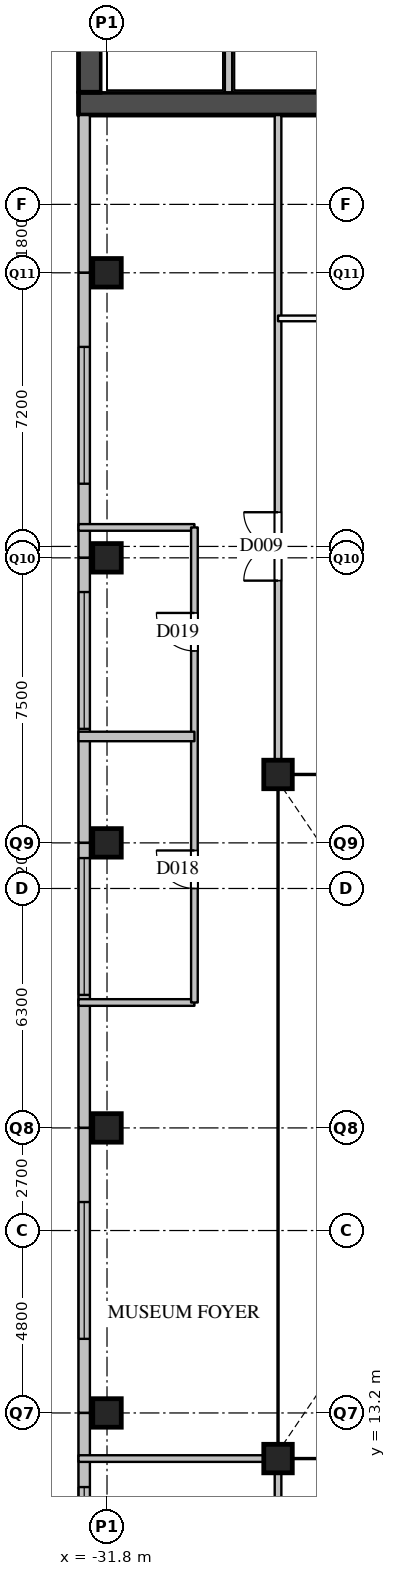
"""IFC4 building model, lengths in metres.
Left out: names, types, materials, properties, quantities, classifications, styles, units other than length and angle.
Written with IfcOpenShell. Run it as: python <this file> out.ifc"""

import sys

from ifc_helpers import new_model, si_unit, direction, frame, frame_2d, origin, origin_2d, place, context, subcontext, project, spatial, rectangle, extrude, element, fill, save


model = new_model("IFC4")
c1 = context("Model", 3, precision=1e-05, world=origin(), true_north=direction((0.0, 1.0)))
c2 = subcontext(c1, "Body", "Model", "MODEL_VIEW")
j1 = project(units=[si_unit("LENGTHUNIT", "METRE"), si_unit("PLANEANGLEUNIT", "RADIAN")], contexts=[c1])
p1 = place(None, origin())
s1 = spatial("IfcSite", under=j1, at=p1, CompositionType="ELEMENT")
p2 = place(p1, origin())
s2 = spatial("IfcBuilding", under=s1, at=p2, CompositionType="ELEMENT")
p3 = place(p2, frame((0.0, 0.0, 8.0)))
s3 = spatial("IfcBuildingStorey", under=s2, at=p3, CompositionType="ELEMENT", Elevation=8.0)
for number, where, z_axis, x_axis in (
    (1, (-31.8, 13.2, 0.0), (0.0, 0.0, 1.0), (1.0, 0.0, 0.0)),
    (2, (-31.8, 20.7, 0.0), (0.0, 0.0, 1.0), (1.0, 0.0, 0.0)),
    (3, (-31.8, 28.2, 0.0), (0.0, 0.0, 1.0), (1.0, 0.0, 0.0)),
    (4, (-31.8, 35.7, 0.0), (0.0, 0.0, 1.0), (1.0, 0.0, 0.0)),
    (5, (-31.8, 43.2, 0.0), (0.0, 0.0, 1.0), (1.0, 0.0, 0.0)),
    (6, (-27.3, 12.0, 0.0), (0.0, 0.0, 1.0), (1.0, 0.0, 0.0)),
    (7, (-27.3, 30.0, 0.0), (0.0, 0.0, 1.0), (1.0, 0.0, 0.0)),
):
    element("IfcColumn", number, at=place(p3, frame(where, z_axis=z_axis, x_axis=x_axis)), inside=s3, PredefinedType="COLUMN", context=c2, shape_type="SweptSolid", body=[
        extrude(rectangle(XDim=0.75, YDim=0.75, at=origin_2d()), origin(), (0.0, 0.0, 1.0), 6.0),
    ])
p4 = place(p3, frame((-32.4, 47.35, 0.0), z_axis=(0.0, 0.0, 1.0), x_axis=(0.0, -1.0, 0.0)))
e8 = element("IfcWall", 8, at=p4, inside=s3, PredefinedType="SOLIDWALL", context=c2, shape_type="SweptSolid", body=[
    extrude(rectangle(XDim=4.15, YDim=0.3, at=frame_2d((2.075, 0.0))), origin(), (0.0, 0.0, 1.0), 5.59),
])
p5 = place(p3, frame((-32.4, 43.2, 0.0), z_axis=(0.0, 0.0, 1.0), x_axis=(0.0, -1.0, 0.0)))
e9 = element("IfcWall", 9, at=p5, inside=s3, PredefinedType="SOLIDWALL", context=c2, shape_type="SweptSolid", body=[
    extrude(rectangle(XDim=7.5, YDim=0.3, at=frame_2d((3.75, 0.0))), origin(), (0.0, 0.0, 1.0), 5.59),
])
p6 = place(p5, frame((1.95, 0.0, 2.4)))
e10 = element("IfcOpeningElement", 10, at=p6, cuts=e9, PredefinedType="OPENING", context=c2, shape_type="SweptSolid", body=[
    extrude(rectangle(XDim=3.6, YDim=1.2, at=frame_2d((1.8, 0.6))), frame((0.0, 0.16, 0.0), z_axis=(0.0, -1.0, 0.0), x_axis=(1.0, 0.0, 0.0)), (0.0, 0.0, 1.0), 0.32),
])
p7 = place(p3, frame((-32.4, 35.7, 0.0), z_axis=(0.0, 0.0, 1.0), x_axis=(0.0, -1.0, 0.0)))
e11 = element("IfcWall", 11, at=p7, inside=s3, PredefinedType="SOLIDWALL", context=c2, shape_type="SweptSolid", body=[
    extrude(rectangle(XDim=7.5, YDim=0.3, at=frame_2d((3.75, 0.0))), origin(), (0.0, 0.0, 1.0), 5.59),
])
p8 = place(p7, frame((0.9, 0.0, 2.4)))
e12 = element("IfcOpeningElement", 12, at=p8, cuts=e11, PredefinedType="OPENING", context=c2, shape_type="SweptSolid", body=[
    extrude(rectangle(XDim=3.6, YDim=1.2, at=frame_2d((1.8, 0.6))), frame((0.0, 0.16, 0.0), z_axis=(0.0, -1.0, 0.0), x_axis=(1.0, 0.0, 0.0)), (0.0, 0.0, 1.0), 0.32),
])
p9 = place(p3, frame((-32.4, 28.2, 0.0), z_axis=(0.0, 0.0, 1.0), x_axis=(0.0, -1.0, 0.0)))
e13 = element("IfcWall", 13, at=p9, inside=s3, PredefinedType="SOLIDWALL", context=c2, shape_type="SweptSolid", body=[
    extrude(rectangle(XDim=7.5, YDim=0.3, at=frame_2d((3.75, 0.0))), origin(), (0.0, 0.0, 1.0), 5.59),
])
p10 = place(p9, frame((0.4, 0.0, 2.4)))
e14 = element("IfcOpeningElement", 14, at=p10, cuts=e13, PredefinedType="OPENING", context=c2, shape_type="SweptSolid", body=[
    extrude(rectangle(XDim=3.6, YDim=1.2, at=frame_2d((1.8, 0.6))), frame((0.0, 0.16, 0.0), z_axis=(0.0, -1.0, 0.0), x_axis=(1.0, 0.0, 0.0)), (0.0, 0.0, 1.0), 0.32),
])
p11 = place(p3, frame((-32.4, 20.7, 0.0), z_axis=(0.0, 0.0, 1.0), x_axis=(0.0, -1.0, 0.0)))
e15 = element("IfcWall", 15, at=p11, inside=s3, PredefinedType="SOLIDWALL", context=c2, shape_type="SweptSolid", body=[
    extrude(rectangle(XDim=7.5, YDim=0.3, at=frame_2d((3.75, 0.0))), origin(), (0.0, 0.0, 1.0), 5.59),
])
p12 = place(p11, frame((1.95, 0.0, 2.4)))
e16 = element("IfcOpeningElement", 16, at=p12, cuts=e15, PredefinedType="OPENING", context=c2, shape_type="SweptSolid", body=[
    extrude(rectangle(XDim=3.6, YDim=1.2, at=frame_2d((1.8, 0.6))), frame((0.0, 0.16, 0.0), z_axis=(0.0, -1.0, 0.0), x_axis=(1.0, 0.0, 0.0)), (0.0, 0.0, 1.0), 0.32),
])
p13 = place(p3, frame((-32.4, 13.2, 0.0), z_axis=(0.0, 0.0, 1.0), x_axis=(0.0, -1.0, 0.0)))
e17 = element("IfcWall", 17, at=p13, inside=s3, PredefinedType="SOLIDWALL", context=c2, shape_type="SweptSolid", body=[
    extrude(rectangle(XDim=7.5, YDim=0.3, at=frame_2d((3.75, 0.0))), origin(), (0.0, 0.0, 1.0), 5.59),
])
p14 = place(p13, frame((1.95, 0.0, 2.4)))
e18 = element("IfcOpeningElement", 18, at=p14, cuts=e17, PredefinedType="OPENING", context=c2, shape_type="SweptSolid", body=[
    extrude(rectangle(XDim=3.6, YDim=1.2, at=frame_2d((1.8, 0.6))), frame((0.0, 0.16, 0.0), z_axis=(0.0, -1.0, 0.0), x_axis=(1.0, 0.0, 0.0)), (0.0, 0.0, 1.0), 0.32),
])
p15 = place(p3, frame((-32.55, 47.65, 0.0), z_axis=(0.0, 0.0, 1.0), x_axis=(1.0, 0.0, 0.0)))
e19 = element("IfcWall", 19, at=p15, inside=s3, PredefinedType="SHEAR", context=c2, shape_type="SweptSolid", body=[
    extrude(rectangle(XDim=12.2, YDim=0.6, at=frame_2d((6.1, 0.0))), origin(), (0.0, 0.0, 1.0), 5.59),
])
p16 = place(p15, frame((8.0, 0.0, 0.0)))
e20 = element("IfcOpeningElement", 20, at=p16, cuts=e19, PredefinedType="OPENING", context=c2, shape_type="SweptSolid", body=[
    extrude(rectangle(XDim=0.7, YDim=2.1, at=frame_2d((0.35, 1.05))), frame((0.0, 0.31, 0.0), z_axis=(0.0, -1.0, 0.0), x_axis=(1.0, 0.0, 0.0)), (0.0, 0.0, 1.0), 0.62),
])
p17 = place(p3, frame((-32.25, 47.95, 0.0), z_axis=(0.0, 0.0, 1.0), x_axis=(0.0, 1.0, 0.0)))
e21 = element("IfcWall", 21, at=p17, inside=s3, PredefinedType="SHEAR", context=c2, shape_type="SweptSolid", body=[
    extrude(rectangle(XDim=10.4, YDim=0.6, at=frame_2d((5.2, 0.0))), origin(), (0.0, 0.0, 1.0), 5.59),
])
p18 = place(p3, frame((-28.6, 47.95, 0.0), z_axis=(0.0, 0.0, 1.0), x_axis=(0.0, 1.0, 0.0)))
e22 = element("IfcWall", 22, at=p18, inside=s3, PredefinedType="SOLIDWALL", context=c2, shape_type="SweptSolid", body=[
    extrude(rectangle(XDim=2.12, YDim=0.2, at=frame_2d((1.06, 0.0))), origin(), (0.0, 0.0, 1.0), 5.59),
])
p19 = place(p3, frame((-32.55, 12.0, 0.0), z_axis=(0.0, 0.0, 1.0), x_axis=(1.0, 0.0, 0.0)))
e23 = element("IfcWall", 23, at=p19, inside=s3, PredefinedType="PARTITIONING", context=c2, shape_type="SweptSolid", body=[
    extrude(rectangle(XDim=5.25, YDim=0.175, at=frame_2d((2.625, 0.0))), origin(), (0.0, 0.0, 1.0), 4.79),
])
for number, where, z_axis, x_axis in (
    (24, (-32.55, 24.0, 0.0), (0.0, 0.0, 1.0), (1.0, 0.0, 0.0)),
    (25, (-32.55, 36.5, 0.0), (0.0, 0.0, 1.0), (1.0, 0.0, 0.0)),
):
    element("IfcWall", number, at=place(p3, frame(where, z_axis=z_axis, x_axis=x_axis)), inside=s3, PredefinedType="PARTITIONING", context=c2, shape_type="SweptSolid", body=[
        extrude(rectangle(XDim=3.05, YDim=0.175, at=frame_2d((1.525, 0.0))), origin(), (0.0, 0.0, 1.0), 4.79),
    ])
p20 = place(p3, frame((-29.5, 24.0, 0.0), z_axis=(0.0, 0.0, 1.0), x_axis=(0.0, 1.0, 0.0)))
e26 = element("IfcWall", 26, at=p20, inside=s3, PredefinedType="PARTITIONING", context=c2, shape_type="SweptSolid", body=[
    extrude(rectangle(XDim=12.5, YDim=0.175, at=frame_2d((6.25, 0.0))), origin(), (0.0, 0.0, 1.0), 4.79),
])
p21 = place(p20, frame((3.0, 0.0, 0.0)))
e27 = element("IfcOpeningElement", 27, at=p21, cuts=e26, PredefinedType="OPENING", context=c2, shape_type="SweptSolid", body=[
    extrude(rectangle(XDim=1.0, YDim=2.1, at=frame_2d((0.5, 1.05))), frame((0.0, 0.097, 0.0), z_axis=(0.0, -1.0, 0.0), x_axis=(1.0, 0.0, 0.0)), (0.0, 0.0, 1.0), 0.195),
])
p22 = place(p20, frame((9.25, 0.0, 0.0)))
e28 = element("IfcOpeningElement", 28, at=p22, cuts=e26, PredefinedType="OPENING", context=c2, shape_type="SweptSolid", body=[
    extrude(rectangle(XDim=1.0, YDim=2.1, at=frame_2d((0.5, 1.05))), frame((0.0, 0.097, 0.0), z_axis=(0.0, -1.0, 0.0), x_axis=(1.0, 0.0, 0.0)), (0.0, 0.0, 1.0), 0.195),
])
p23 = place(p3, frame((-27.3, 3.0, 0.0), z_axis=(0.0, 0.0, 1.0), x_axis=(0.0, 1.0, 0.0)))
e29 = element("IfcWall", 29, at=p23, inside=s3, PredefinedType="PARTITIONING", context=c2, shape_type="SweptSolid", body=[
    extrude(rectangle(XDim=9.0, YDim=0.175, at=frame_2d((4.5, 0.0))), origin(), (0.0, 0.0, 1.0), 4.79),
])
p24 = place(p23, frame((4.0, 0.0, 0.0)))
e30 = element("IfcOpeningElement", 30, at=p24, cuts=e29, PredefinedType="OPENING", context=c2, shape_type="SweptSolid", body=[
    extrude(rectangle(XDim=1.0, YDim=2.1, at=frame_2d((0.5, 1.05))), frame((0.0, 0.097, 0.0), z_axis=(0.0, -1.0, 0.0), x_axis=(1.0, 0.0, 0.0)), (0.0, 0.0, 1.0), 0.195),
])
p25 = place(p3, frame((-27.3, 30.0, 0.0), z_axis=(0.0, 0.0, 1.0), x_axis=(0.0, 1.0, 0.0)))
e31 = element("IfcWall", 31, at=p25, inside=s3, PredefinedType="PARTITIONING", context=c2, shape_type="SweptSolid", body=[
    extrude(rectangle(XDim=17.35, YDim=0.175, at=frame_2d((8.675, 0.0))), origin(), (0.0, 0.0, 1.0), 4.79),
])
p26 = place(p25, frame((5.1, 0.0, 0.0)))
e32 = element("IfcOpeningElement", 32, at=p26, cuts=e31, PredefinedType="OPENING", context=c2, shape_type="SweptSolid", body=[
    extrude(rectangle(XDim=1.8, YDim=2.1, at=frame_2d((0.9, 1.05))), frame((0.0, 0.097, 0.0), z_axis=(0.0, -1.0, 0.0), x_axis=(1.0, 0.0, 0.0)), (0.0, 0.0, 1.0), 0.195),
])
p27 = place(p3, frame((-27.3, 42.0, 0.0), z_axis=(0.0, 0.0, 1.0), x_axis=(1.0, 0.0, 0.0)))
e33 = element("IfcWall", 33, at=p27, inside=s3, PredefinedType="PARTITIONING", context=c2, shape_type="SweptSolid", body=[
    extrude(rectangle(XDim=23.25, YDim=0.15, at=frame_2d((11.625, 0.0))), origin(), (0.0, 0.0, 1.0), 4.79),
])
p28 = place(p3, frame((-32.55, 31.0, 0.0), z_axis=(0.0, 0.0, 1.0), x_axis=(1.0, 0.0, 0.0)))
e34 = element("IfcWall", 34, at=p28, inside=s3, PredefinedType="PARTITIONING", context=c2, shape_type="SweptSolid", body=[
    extrude(rectangle(XDim=3.05, YDim=0.25, at=frame_2d((1.525, 0.0))), origin(), (0.0, 0.0, 1.0), 4.79),
])
p29 = place(p6, origin())
e35 = element("IfcWindow", 35, at=p29, inside=s3, PartitioningType="SINGLE_PANEL", PredefinedType="WINDOW", context=c2, shape_type="SweptSolid", body=[
    extrude(rectangle(XDim=3.6, YDim=1.2, at=frame_2d((1.8, 0.6))), frame((0.0, 0.03, 0.0), z_axis=(0.0, -1.0, 0.0), x_axis=(1.0, 0.0, 0.0)), (0.0, 0.0, 1.0), 0.06),
])
fill(e10, e35)
p30 = place(p8, origin())
e36 = element("IfcWindow", 36, at=p30, inside=s3, PartitioningType="SINGLE_PANEL", PredefinedType="WINDOW", context=c2, shape_type="SweptSolid", body=[
    extrude(rectangle(XDim=3.6, YDim=1.2, at=frame_2d((1.8, 0.6))), frame((0.0, 0.03, 0.0), z_axis=(0.0, -1.0, 0.0), x_axis=(1.0, 0.0, 0.0)), (0.0, 0.0, 1.0), 0.06),
])
fill(e12, e36)
p31 = place(p10, origin())
e37 = element("IfcWindow", 37, at=p31, inside=s3, PartitioningType="SINGLE_PANEL", PredefinedType="WINDOW", context=c2, shape_type="SweptSolid", body=[
    extrude(rectangle(XDim=3.6, YDim=1.2, at=frame_2d((1.8, 0.6))), frame((0.0, 0.03, 0.0), z_axis=(0.0, -1.0, 0.0), x_axis=(1.0, 0.0, 0.0)), (0.0, 0.0, 1.0), 0.06),
])
fill(e14, e37)
p32 = place(p12, origin())
e38 = element("IfcWindow", 38, at=p32, inside=s3, PartitioningType="SINGLE_PANEL", PredefinedType="WINDOW", context=c2, shape_type="SweptSolid", body=[
    extrude(rectangle(XDim=3.6, YDim=1.2, at=frame_2d((1.8, 0.6))), frame((0.0, 0.03, 0.0), z_axis=(0.0, -1.0, 0.0), x_axis=(1.0, 0.0, 0.0)), (0.0, 0.0, 1.0), 0.06),
])
fill(e16, e38)
p33 = place(p14, origin())
e39 = element("IfcWindow", 39, at=p33, inside=s3, PartitioningType="SINGLE_PANEL", PredefinedType="WINDOW", context=c2, shape_type="SweptSolid", body=[
    extrude(rectangle(XDim=3.6, YDim=1.2, at=frame_2d((1.8, 0.6))), frame((0.0, 0.03, 0.0), z_axis=(0.0, -1.0, 0.0), x_axis=(1.0, 0.0, 0.0)), (0.0, 0.0, 1.0), 0.06),
])
fill(e18, e39)
p34 = place(p26, origin())
e40 = element("IfcDoor", 40, at=p34, inside=s3, OperationType="DOUBLE_DOOR_SINGLE_SWING", PredefinedType="DOOR", context=c2, shape_type="SweptSolid", body=[
    extrude(rectangle(XDim=1.8, YDim=2.1, at=frame_2d((0.9, 1.05))), frame((0.0, 0.025, 0.0), z_axis=(0.0, -1.0, 0.0), x_axis=(1.0, 0.0, 0.0)), (0.0, 0.0, 1.0), 0.05),
])
fill(e32, e40)
p35 = place(p21, origin())
e41 = element("IfcDoor", 41, at=p35, inside=s3, OperationType="SINGLE_SWING_RIGHT", PredefinedType="DOOR", context=c2, shape_type="SweptSolid", body=[
    extrude(rectangle(XDim=1.0, YDim=2.1, at=frame_2d((0.5, 1.05))), frame((0.0, 0.025, 0.0), z_axis=(0.0, -1.0, 0.0), x_axis=(1.0, 0.0, 0.0)), (0.0, 0.0, 1.0), 0.05),
])
fill(e27, e41)
p36 = place(p22, origin())
e42 = element("IfcDoor", 42, at=p36, inside=s3, OperationType="SINGLE_SWING_RIGHT", PredefinedType="DOOR", context=c2, shape_type="SweptSolid", body=[
    extrude(rectangle(XDim=1.0, YDim=2.1, at=frame_2d((0.5, 1.05))), frame((0.0, 0.025, 0.0), z_axis=(0.0, -1.0, 0.0), x_axis=(1.0, 0.0, 0.0)), (0.0, 0.0, 1.0), 0.05),
])
fill(e28, e42)
save(model, sys.argv[1])
